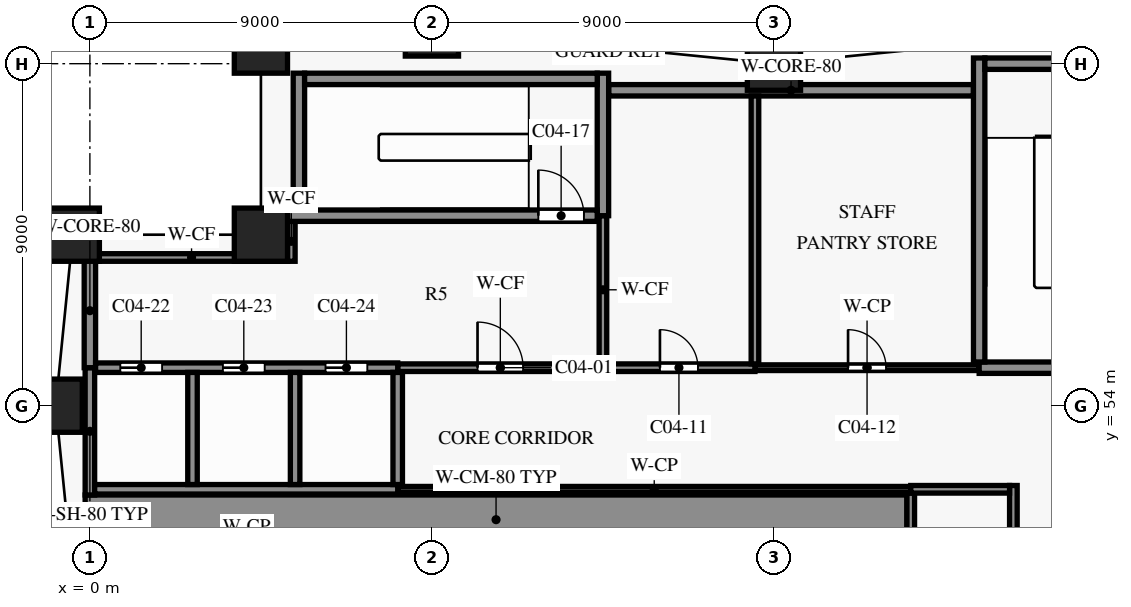
"""IFC4 building model, lengths in metres.
Left out: names, types, materials, properties, quantities, classifications, styles, units other than length and angle.
Written with IfcOpenShell. Run it as: python <this file> out.ifc"""

import sys

from ifc_helpers import new_model, si_unit, direction, frame, frame_2d, origin, origin_2d, place, context, subcontext, project, spatial, rectangle, extrude, element, fill, save


model = new_model("IFC4")
c1 = context("Model", 3, precision=1e-05, world=origin(), true_north=direction((0.0, 1.0)))
c2 = subcontext(c1, "Body", "Model", "MODEL_VIEW")
j1 = project(units=[si_unit("LENGTHUNIT", "METRE"), si_unit("PLANEANGLEUNIT", "RADIAN")], contexts=[c1])
p1 = place(None, origin())
s1 = spatial("IfcSite", under=j1, at=p1, CompositionType="ELEMENT")
p2 = place(p1, origin())
s2 = spatial("IfcBuilding", under=s1, at=p2, CompositionType="ELEMENT")
p3 = place(p2, frame((0.0, 0.0, 14.5)))
s3 = spatial("IfcBuildingStorey", under=s2, at=p3, CompositionType="ELEMENT", Elevation=14.5)
for number, where, z_axis, x_axis in (
    (1, (18.0, 63.0, 0.0), (0.0, 0.0, 1.0), (1.0, 0.0, 0.0)),
    (2, (9.0, 63.9, 0.0), (0.0, 0.0, 1.0), (1.0, 0.0, 0.0)),
    (3, (4.5, 63.45, 0.0), (0.0, 0.0, 1.0), (1.0, 0.0, 0.0)),
    (4, (-0.45, 58.5, 0.0), (0.0, 0.0, 1.0), (1.0, 0.0, 0.0)),
    (5, (-0.9, 54.0, 0.0), (0.0, 0.0, 1.0), (1.0, 0.0, 0.0)),
    (6, (4.5, 58.5, 0.0), (0.0, 0.0, 1.0), (1.0, 0.0, 0.0)),
):
    element("IfcColumn", number, at=place(p3, frame(where, z_axis=z_axis, x_axis=x_axis)), inside=s3, PredefinedType="COLUMN", context=c2, shape_type="SweptSolid", body=[
        extrude(rectangle(XDim=1.4, YDim=1.4, at=origin_2d()), origin(), (0.0, 0.0, 1.0), 5.0),
    ])
p4 = place(p3, frame((-0.125, 51.0, 0.0), z_axis=(0.0, 0.0, 1.0), x_axis=(1.0, 0.0, 0.0)))
e7 = element("IfcWall", 7, at=p4, inside=s3, PredefinedType="SHEAR", context=c2, shape_type="SweptSolid", body=[
    extrude(rectangle(XDim=21.625, YDim=1.3, at=frame_2d((10.812, 0.0))), origin(), (0.0, 0.0, 1.0), 4.7),
])
p5 = place(p3, frame((8.1, 51.8, 0.0), z_axis=(0.0, 0.0, 1.0), x_axis=(1.0, 0.0, 0.0)))
e8 = element("IfcWall", 8, at=p5, inside=s3, PredefinedType="PARTITIONING", context=c2, shape_type="SweptSolid", body=[
    extrude(rectangle(XDim=13.5, YDim=0.15, at=frame_2d((6.75, 0.0))), origin(), (0.0, 0.0, 1.0), 4.7),
])
p6 = place(p3, frame((21.6, 51.8, 0.0), z_axis=(0.0, 0.0, 1.0), x_axis=(1.0, 0.0, 0.0)))
e9 = element("IfcWall", 9, at=p6, inside=s3, PredefinedType="PARTITIONING", context=c2, shape_type="SweptSolid", body=[
    extrude(rectangle(XDim=2.6, YDim=0.2, at=frame_2d((1.3, 0.0))), origin(), (0.0, 0.0, 1.0), 4.7),
])
p7 = place(p3, frame((0.125, 51.8, 0.0), z_axis=(0.0, 0.0, 1.0), x_axis=(1.0, 0.0, 0.0)))
e10 = element("IfcWall", 10, at=p7, inside=s3, PredefinedType="SHEAR", context=c2, shape_type="SweptSolid", body=[
    extrude(rectangle(XDim=7.975, YDim=0.25, at=frame_2d((3.988, 0.0))), origin(), (0.0, 0.0, 1.0), 4.7),
])
p8 = place(p3, frame((8.1, 55.0, 0.0), z_axis=(0.0, 0.0, 1.0), x_axis=(1.0, 0.0, 0.0)))
e11 = element("IfcWall", 11, at=p8, inside=s3, PredefinedType="PARTITIONING", context=c2, shape_type="SweptSolid", body=[
    extrude(rectangle(XDim=5.4, YDim=0.2, at=frame_2d((2.7, 0.0))), origin(), (0.0, 0.0, 1.0), 4.7),
])
p9 = place(p8, frame((2.1, 0.0, 0.0)))
e12 = element("IfcOpeningElement", 12, at=p9, cuts=e11, PredefinedType="OPENING", context=c2, shape_type="SweptSolid", body=[
    extrude(rectangle(XDim=1.2, YDim=2.2, at=frame_2d((0.6, 1.1))), frame((0.0, 0.11, 0.0), z_axis=(0.0, -1.0, 0.0), x_axis=(1.0, 0.0, 0.0)), (0.0, 0.0, 1.0), 0.22),
])
p10 = place(p3, frame((17.5, 55.0, 0.0), z_axis=(0.0, 0.0, 1.0), x_axis=(1.0, 0.0, 0.0)))
e13 = element("IfcWall", 13, at=p10, inside=s3, PredefinedType="PARTITIONING", context=c2, shape_type="SweptSolid", body=[
    extrude(rectangle(XDim=5.9, YDim=0.15, at=frame_2d((2.95, 0.0))), origin(), (0.0, 0.0, 1.0), 4.7),
])
p11 = place(p10, frame((2.45, 0.0, 0.0)))
e14 = element("IfcOpeningElement", 14, at=p11, cuts=e13, PredefinedType="OPENING", context=c2, shape_type="SweptSolid", body=[
    extrude(rectangle(XDim=1.0, YDim=2.1, at=frame_2d((0.5, 1.05))), frame((0.0, 0.085, 0.0), z_axis=(0.0, -1.0, 0.0), x_axis=(1.0, 0.0, 0.0)), (0.0, 0.0, 1.0), 0.17),
])
p12 = place(p3, frame((13.5, 55.0, 0.0), z_axis=(0.0, 0.0, 1.0), x_axis=(1.0, 0.0, 0.0)))
e15 = element("IfcWall", 15, at=p12, inside=s3, PredefinedType="PARTITIONING", context=c2, shape_type="SweptSolid", body=[
    extrude(rectangle(XDim=4.0, YDim=0.2, at=frame_2d((2.0, 0.0))), origin(), (0.0, 0.0, 1.0), 4.7),
])
p13 = place(p12, frame((1.5, 0.0, 0.0)))
e16 = element("IfcOpeningElement", 16, at=p13, cuts=e15, PredefinedType="OPENING", context=c2, shape_type="SweptSolid", body=[
    extrude(rectangle(XDim=1.0, YDim=2.1, at=frame_2d((0.5, 1.05))), frame((0.0, 0.11, 0.0), z_axis=(0.0, -1.0, 0.0), x_axis=(1.0, 0.0, 0.0)), (0.0, 0.0, 1.0), 0.22),
])
p14 = place(p3, frame((0.15, 55.0, 0.0), z_axis=(0.0, 0.0, 1.0), x_axis=(1.0, 0.0, 0.0)))
e17 = element("IfcWall", 17, at=p14, inside=s3, PredefinedType="SHEAR", context=c2, shape_type="SweptSolid", body=[
    extrude(rectangle(XDim=7.95, YDim=0.25, at=frame_2d((3.975, 0.0))), origin(), (0.0, 0.0, 1.0), 4.7),
])
p15 = place(p14, frame((0.65, 0.0, 0.0)))
e18 = element("IfcOpeningElement", 18, at=p15, cuts=e17, PredefinedType="OPENING", context=c2, shape_type="SweptSolid", body=[
    extrude(rectangle(XDim=1.1, YDim=2.1, at=frame_2d((0.55, 1.05))), frame((0.0, 0.135, 0.0), z_axis=(0.0, -1.0, 0.0), x_axis=(1.0, 0.0, 0.0)), (0.0, 0.0, 1.0), 0.27),
])
p16 = place(p14, frame((3.35, 0.0, 0.0)))
e19 = element("IfcOpeningElement", 19, at=p16, cuts=e17, PredefinedType="OPENING", context=c2, shape_type="SweptSolid", body=[
    extrude(rectangle(XDim=1.1, YDim=2.1, at=frame_2d((0.55, 1.05))), frame((0.0, 0.135, 0.0), z_axis=(0.0, -1.0, 0.0), x_axis=(1.0, 0.0, 0.0)), (0.0, 0.0, 1.0), 0.27),
])
p17 = place(p14, frame((6.05, 0.0, 0.0)))
e20 = element("IfcOpeningElement", 20, at=p17, cuts=e17, PredefinedType="OPENING", context=c2, shape_type="SweptSolid", body=[
    extrude(rectangle(XDim=1.1, YDim=2.1, at=frame_2d((0.55, 1.05))), frame((0.0, 0.135, 0.0), z_axis=(0.0, -1.0, 0.0), x_axis=(1.0, 0.0, 0.0)), (0.0, 0.0, 1.0), 0.27),
])
p18 = place(p3, frame((23.4, 55.0, 0.0), z_axis=(0.0, 0.0, 1.0), x_axis=(1.0, 0.0, 0.0)))
e21 = element("IfcWall", 21, at=p18, inside=s3, PredefinedType="SHEAR", context=c2, shape_type="SweptSolid", body=[
    extrude(rectangle(XDim=3.45, YDim=0.3, at=frame_2d((1.725, 0.0))), origin(), (0.0, 0.0, 1.0), 4.7),
])
p19 = place(p3, frame((0.15, 57.9, 0.0), z_axis=(0.0, 0.0, 1.0), x_axis=(1.0, 0.0, 0.0)))
e22 = element("IfcWall", 22, at=p19, inside=s3, PredefinedType="PARTITIONING", context=c2, shape_type="SweptSolid", body=[
    extrude(rectangle(XDim=5.05, YDim=0.2, at=frame_2d((2.525, 0.0))), origin(), (0.0, 0.0, 1.0), 4.7),
])
p20 = place(p3, frame((5.2, 59.0, 0.0), z_axis=(0.0, 0.0, 1.0), x_axis=(1.0, 0.0, 0.0)))
e23 = element("IfcWall", 23, at=p20, inside=s3, PredefinedType="SHEAR", context=c2, shape_type="SweptSolid", body=[
    extrude(rectangle(XDim=8.15, YDim=0.3, at=frame_2d((4.075, 0.0))), origin(), (0.0, 0.0, 1.0), 4.7),
])
p21 = place(p20, frame((6.6, 0.0, 0.0)))
e24 = element("IfcOpeningElement", 24, at=p21, cuts=e23, PredefinedType="OPENING", context=c2, shape_type="SweptSolid", body=[
    extrude(rectangle(XDim=1.2, YDim=2.2, at=frame_2d((0.6, 1.1))), frame((0.0, 0.16, 0.0), z_axis=(0.0, -1.0, 0.0), x_axis=(1.0, 0.0, 0.0)), (0.0, 0.0, 1.0), 0.32),
])
p22 = place(p3, frame((13.65, 62.3, 0.0), z_axis=(0.0, 0.0, 1.0), x_axis=(1.0, 0.0, 0.0)))
e25 = element("IfcWall", 25, at=p22, inside=s3, PredefinedType="SHEAR", context=c2, shape_type="SweptSolid", body=[
    extrude(rectangle(XDim=9.6, YDim=0.3, at=frame_2d((4.8, 0.0))), origin(), (0.0, 0.0, 1.0), 4.7),
])
p23 = place(p3, frame((5.65, 62.6, 0.0), z_axis=(0.0, 0.0, 1.0), x_axis=(1.0, 0.0, 0.0)))
e26 = element("IfcWall", 26, at=p23, inside=s3, PredefinedType="SHEAR", context=c2, shape_type="SweptSolid", body=[
    extrude(rectangle(XDim=7.7, YDim=0.3, at=frame_2d((3.85, 0.0))), origin(), (0.0, 0.0, 1.0), 4.7),
])
p24 = place(p3, frame((23.55, 63.0, 0.0), z_axis=(0.0, 0.0, 1.0), x_axis=(1.0, 0.0, 0.0)))
e27 = element("IfcWall", 27, at=p24, inside=s3, PredefinedType="SHEAR", context=c2, shape_type="SweptSolid", body=[
    extrude(rectangle(XDim=3.3, YDim=0.3, at=frame_2d((1.65, 0.0))), origin(), (0.0, 0.0, 1.0), 4.7),
])
p25 = place(p3, frame((0.0, 55.0, 0.0), z_axis=(0.0, 0.0, 1.0), x_axis=(0.0, 1.0, 0.0)))
e28 = element("IfcWall", 28, at=p25, inside=s3, PredefinedType="SHEAR", context=c2, shape_type="SweptSolid", body=[
    extrude(rectangle(XDim=3.0, YDim=0.3, at=frame_2d((1.5, 0.0))), origin(), (0.0, 0.0, 1.0), 4.7),
])
p26 = place(p3, frame((0.0, 51.65, 0.0), z_axis=(0.0, 0.0, 1.0), x_axis=(0.0, 1.0, 0.0)))
e29 = element("IfcWall", 29, at=p26, inside=s3, PredefinedType="SHEAR", context=c2, shape_type="SweptSolid", body=[
    extrude(rectangle(XDim=3.35, YDim=0.25, at=frame_2d((1.675, 0.0))), origin(), (0.0, 0.0, 1.0), 4.7),
])
p27 = place(p3, frame((2.7, 51.925, 0.0), z_axis=(0.0, 0.0, 1.0), x_axis=(0.0, 1.0, 0.0)))
e30 = element("IfcWall", 30, at=p27, inside=s3, PredefinedType="SHEAR", context=c2, shape_type="SweptSolid", body=[
    extrude(rectangle(XDim=2.95, YDim=0.25, at=frame_2d((1.475, 0.0))), origin(), (0.0, 0.0, 1.0), 4.7),
])
p28 = place(p3, frame((5.3, 57.8, 0.0), z_axis=(0.0, 0.0, 1.0), x_axis=(0.0, 1.0, 0.0)))
e31 = element("IfcWall", 31, at=p28, inside=s3, PredefinedType="PARTITIONING", context=c2, shape_type="SweptSolid", body=[
    extrude(rectangle(XDim=1.05, YDim=0.2, at=frame_2d((0.525, 0.0))), origin(), (0.0, 0.0, 1.0), 4.7),
])
p29 = place(p3, frame((5.4, 51.925, 0.0), z_axis=(0.0, 0.0, 1.0), x_axis=(0.0, 1.0, 0.0)))
e32 = element("IfcWall", 32, at=p29, inside=s3, PredefinedType="SHEAR", context=c2, shape_type="SweptSolid", body=[
    extrude(rectangle(XDim=2.95, YDim=0.25, at=frame_2d((1.475, 0.0))), origin(), (0.0, 0.0, 1.0), 4.7),
])
p30 = place(p3, frame((5.5, 59.15, 0.0), z_axis=(0.0, 0.0, 1.0), x_axis=(0.0, 1.0, 0.0)))
e33 = element("IfcWall", 33, at=p30, inside=s3, PredefinedType="SHEAR", context=c2, shape_type="SweptSolid", body=[
    extrude(rectangle(XDim=3.6, YDim=0.3, at=frame_2d((1.8, 0.0))), origin(), (0.0, 0.0, 1.0), 4.7),
])
p31 = place(p3, frame((8.1, 51.925, 0.0), z_axis=(0.0, 0.0, 1.0), x_axis=(0.0, 1.0, 0.0)))
e34 = element("IfcWall", 34, at=p31, inside=s3, PredefinedType="SHEAR", context=c2, shape_type="SweptSolid", body=[
    extrude(rectangle(XDim=2.95, YDim=0.25, at=frame_2d((1.475, 0.0))), origin(), (0.0, 0.0, 1.0), 4.7),
])
p32 = place(p3, frame((13.5, 55.1, 0.0), z_axis=(0.0, 0.0, 1.0), x_axis=(0.0, 1.0, 0.0)))
e35 = element("IfcWall", 35, at=p32, inside=s3, PredefinedType="PARTITIONING", context=c2, shape_type="SweptSolid", body=[
    extrude(rectangle(XDim=3.9, YDim=0.2, at=frame_2d((1.95, 0.0))), origin(), (0.0, 0.0, 1.0), 4.7),
])
p33 = place(p3, frame((13.5, 59.0, 0.0), z_axis=(0.0, 0.0, 1.0), x_axis=(0.0, 1.0, 0.0)))
e36 = element("IfcWall", 36, at=p33, inside=s3, PredefinedType="SHEAR", context=c2, shape_type="SweptSolid", body=[
    extrude(rectangle(XDim=3.75, YDim=0.3, at=frame_2d((1.875, 0.0))), origin(), (0.0, 0.0, 1.0), 4.7),
])
p34 = place(p3, frame((17.5, 55.1, 0.0), z_axis=(0.0, 0.0, 1.0), x_axis=(0.0, 1.0, 0.0)))
e37 = element("IfcWall", 37, at=p34, inside=s3, PredefinedType="PARTITIONING", context=c2, shape_type="SweptSolid", body=[
    extrude(rectangle(XDim=7.05, YDim=0.2, at=frame_2d((3.525, 0.0))), origin(), (0.0, 0.0, 1.0), 4.7),
])
p35 = place(p3, frame((21.6, 50.2, 0.0), z_axis=(0.0, 0.0, 1.0), x_axis=(0.0, 1.0, 0.0)))
e38 = element("IfcWall", 38, at=p35, inside=s3, PredefinedType="PARTITIONING", context=c2, shape_type="SweptSolid", body=[
    extrude(rectangle(XDim=1.5, YDim=0.2, at=frame_2d((0.75, 0.0))), origin(), (0.0, 0.0, 1.0), 4.7),
])
p36 = place(p3, frame((23.4, 55.15, 0.0), z_axis=(0.0, 0.0, 1.0), x_axis=(0.0, 1.0, 0.0)))
e39 = element("IfcWall", 39, at=p36, inside=s3, PredefinedType="SHEAR", context=c2, shape_type="SweptSolid", body=[
    extrude(rectangle(XDim=8.0, YDim=0.3, at=frame_2d((4.0, 0.0))), origin(), (0.0, 0.0, 1.0), 4.7),
])
p37 = place(p3, frame((24.3, 46.9, 0.0), z_axis=(0.0, 0.0, 1.0), x_axis=(0.0, 1.0, 0.0)))
e40 = element("IfcWall", 40, at=p37, inside=s3, PredefinedType="SHEAR", context=c2, shape_type="SweptSolid", body=[
    extrude(rectangle(XDim=5.0, YDim=0.2, at=frame_2d((2.5, 0.0))), origin(), (0.0, 0.0, 1.0), 4.7),
])
p38 = place(p9, origin())
e41 = element("IfcDoor", 41, at=p38, inside=s3, OperationType="SINGLE_SWING_RIGHT", PredefinedType="DOOR", context=c2, shape_type="SweptSolid", body=[
    extrude(rectangle(XDim=1.2, YDim=2.2, at=frame_2d((0.6, 1.1))), frame((0.0, 0.025, 0.0), z_axis=(0.0, -1.0, 0.0), x_axis=(1.0, 0.0, 0.0)), (0.0, 0.0, 1.0), 0.05),
])
fill(e12, e41)
p39 = place(p13, origin())
e42 = element("IfcDoor", 42, at=p39, inside=s3, OperationType="SINGLE_SWING_LEFT", PredefinedType="DOOR", context=c2, shape_type="SweptSolid", body=[
    extrude(rectangle(XDim=1.0, YDim=2.1, at=frame_2d((0.5, 1.05))), frame((0.0, 0.025, 0.0), z_axis=(0.0, -1.0, 0.0), x_axis=(1.0, 0.0, 0.0)), (0.0, 0.0, 1.0), 0.05),
])
fill(e16, e42)
p40 = place(p11, origin())
e43 = element("IfcDoor", 43, at=p40, inside=s3, OperationType="SINGLE_SWING_RIGHT", PredefinedType="DOOR", context=c2, shape_type="SweptSolid", body=[
    extrude(rectangle(XDim=1.0, YDim=2.1, at=frame_2d((0.5, 1.05))), frame((0.0, 0.025, 0.0), z_axis=(0.0, -1.0, 0.0), x_axis=(1.0, 0.0, 0.0)), (0.0, 0.0, 1.0), 0.05),
])
fill(e14, e43)
p41 = place(p21, origin())
e44 = element("IfcDoor", 44, at=p41, inside=s3, OperationType="SINGLE_SWING_RIGHT", PredefinedType="DOOR", context=c2, shape_type="SweptSolid", body=[
    extrude(rectangle(XDim=1.2, YDim=2.2, at=frame_2d((0.6, 1.1))), frame((0.0, 0.025, 0.0), z_axis=(0.0, -1.0, 0.0), x_axis=(1.0, 0.0, 0.0)), (0.0, 0.0, 1.0), 0.05),
])
fill(e24, e44)
p42 = place(p15, origin())
e45 = element("IfcDoor", 45, at=p42, inside=s3, OperationType="DOUBLE_DOOR_SLIDING", PredefinedType="DOOR", context=c2, shape_type="SweptSolid", body=[
    extrude(rectangle(XDim=1.1, YDim=2.1, at=frame_2d((0.55, 1.05))), frame((0.0, 0.025, 0.0), z_axis=(0.0, -1.0, 0.0), x_axis=(1.0, 0.0, 0.0)), (0.0, 0.0, 1.0), 0.05),
])
fill(e18, e45)
p43 = place(p16, origin())
e46 = element("IfcDoor", 46, at=p43, inside=s3, OperationType="DOUBLE_DOOR_SLIDING", PredefinedType="DOOR", context=c2, shape_type="SweptSolid", body=[
    extrude(rectangle(XDim=1.1, YDim=2.1, at=frame_2d((0.55, 1.05))), frame((0.0, 0.025, 0.0), z_axis=(0.0, -1.0, 0.0), x_axis=(1.0, 0.0, 0.0)), (0.0, 0.0, 1.0), 0.05),
])
fill(e19, e46)
p44 = place(p17, origin())
e47 = element("IfcDoor", 47, at=p44, inside=s3, OperationType="DOUBLE_DOOR_SLIDING", PredefinedType="DOOR", context=c2, shape_type="SweptSolid", body=[
    extrude(rectangle(XDim=1.1, YDim=2.1, at=frame_2d((0.55, 1.05))), frame((0.0, 0.025, 0.0), z_axis=(0.0, -1.0, 0.0), x_axis=(1.0, 0.0, 0.0)), (0.0, 0.0, 1.0), 0.05),
])
fill(e20, e47)
save(model, sys.argv[1])
